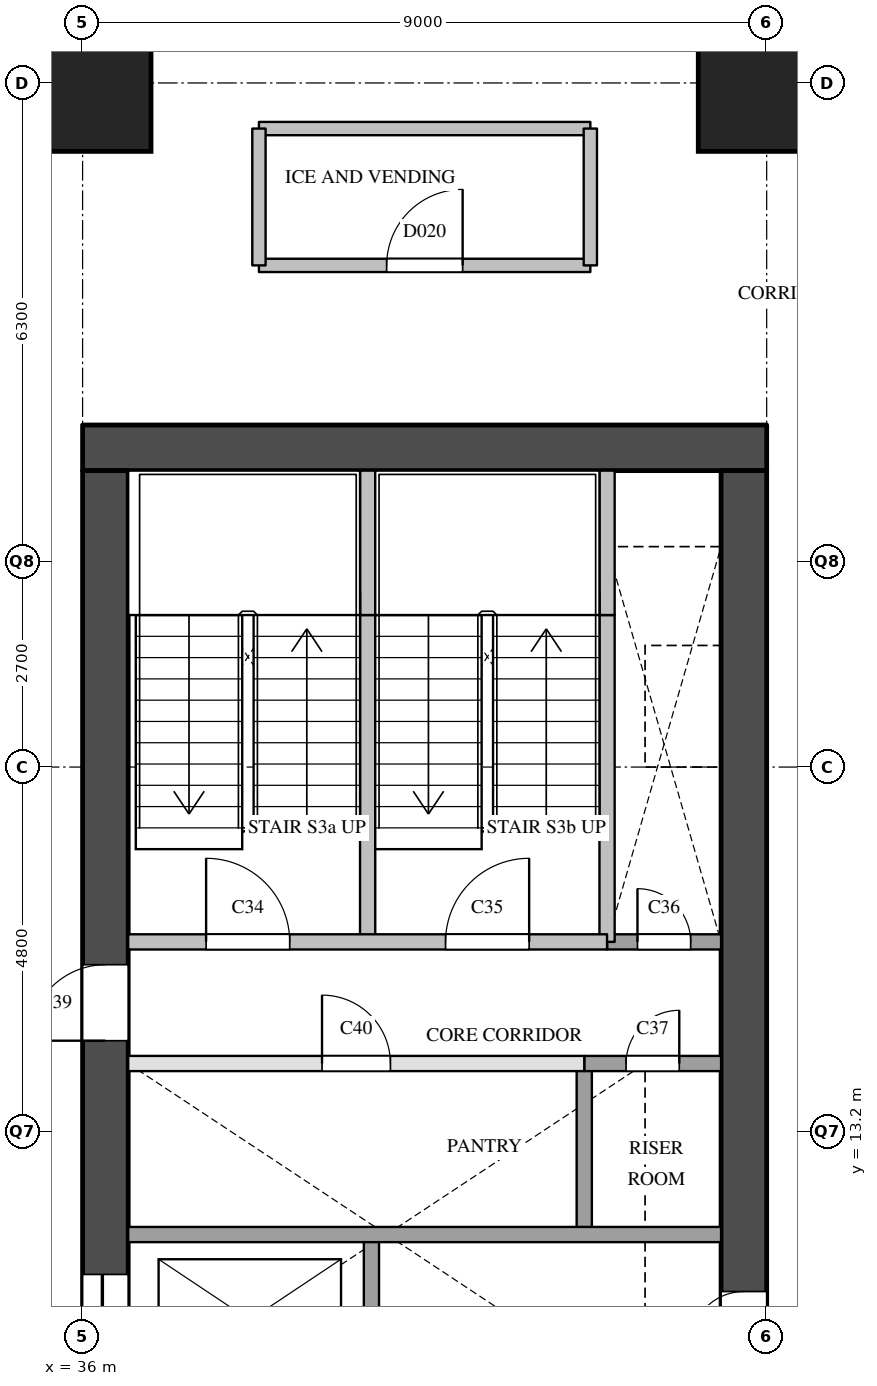
"""IFC4 building model, lengths in metres.
Left out: names, types, materials, properties, quantities, classifications, styles, units other than length and angle.
Written with IfcOpenShell. Run it as: python <this file> out.ifc"""

import sys

from ifc_helpers import new_model, si_unit, direction, frame, frame_2d, origin, origin_2d, place, context, subcontext, project, spatial, rectangle, extrude, element, fill, save


model = new_model("IFC4")
c1 = context("Model", 3, precision=1e-05, world=origin(), true_north=direction((0.0, 1.0)))
c2 = subcontext(c1, "Body", "Model", "MODEL_VIEW")
j1 = project(units=[si_unit("LENGTHUNIT", "METRE"), si_unit("PLANEANGLEUNIT", "RADIAN")], contexts=[c1])
p1 = place(None, origin())
s1 = spatial("IfcSite", under=j1, at=p1, CompositionType="ELEMENT")
p2 = place(p1, origin())
s2 = spatial("IfcBuilding", under=s1, at=p2, CompositionType="ELEMENT")
p3 = place(p2, frame((0.0, 0.0, 85.4)))
s3 = spatial("IfcBuildingStorey", under=s2, at=p3, CompositionType="ELEMENT", Elevation=85.4)
for number, where, z_axis, x_axis in (
    (1, (36.0, 27.0, 0.0), (0.0, 0.0, 1.0), (1.0, 0.0, 0.0)),
    (2, (45.0, 27.0, 0.0), (0.0, 0.0, 1.0), (1.0, 0.0, 0.0)),
):
    element("IfcColumn", number, at=place(p3, frame(where, z_axis=z_axis, x_axis=x_axis)), inside=s3, PredefinedType="COLUMN", context=c2, shape_type="SweptSolid", body=[
        extrude(rectangle(XDim=1.8, YDim=1.8, at=origin_2d()), origin(), (0.0, 0.0, 1.0), 3.8),
    ])
p4 = place(p3, frame((36.0, 22.2, 0.0), z_axis=(0.0, 0.0, 1.0), x_axis=(1.0, 0.0, 0.0)))
e3 = element("IfcWall", 3, at=p4, inside=s3, PredefinedType="SHEAR", context=c2, shape_type="SweptSolid", body=[
    extrude(rectangle(XDim=9.0, YDim=0.6, at=frame_2d((4.5, 0.0))), origin(), (0.0, 0.0, 1.0), 3.5),
])
p5 = place(p3, frame((36.3, 9.6, 0.0), z_axis=(0.0, 0.0, 1.0), x_axis=(0.0, 1.0, 0.0)))
e4 = element("IfcWall", 4, at=p5, inside=s3, PredefinedType="SHEAR", context=c2, shape_type="SweptSolid", body=[
    extrude(rectangle(XDim=12.3, YDim=0.6, at=frame_2d((6.15, 0.0))), origin(), (0.0, 0.0, 1.0), 3.5),
])
p6 = place(p5, frame((0.525, 0.0, 0.0)))
e5 = element("IfcOpeningElement", 5, at=p6, cuts=e4, PredefinedType="OPENING", context=c2, shape_type="SweptSolid", body=[
    extrude(rectangle(XDim=1.2, YDim=2.1, at=frame_2d((0.6, 1.05))), frame((0.0, 0.31, 0.0), z_axis=(0.0, -1.0, 0.0), x_axis=(1.0, 0.0, 0.0)), (0.0, 0.0, 1.0), 0.62),
])
p7 = place(p5, frame((4.8, 0.0, 0.0)))
e6 = element("IfcOpeningElement", 6, at=p7, cuts=e4, PredefinedType="OPENING", context=c2, shape_type="SweptSolid", body=[
    extrude(rectangle(XDim=1.0, YDim=2.1, at=frame_2d((0.5, 1.05))), frame((0.0, 0.31, 0.0), z_axis=(0.0, -1.0, 0.0), x_axis=(1.0, 0.0, 0.0)), (0.0, 0.0, 1.0), 0.62),
])
p8 = place(p3, frame((44.7, 9.6, 0.0), z_axis=(0.0, 0.0, 1.0), x_axis=(0.0, 1.0, 0.0)))
e7 = element("IfcWall", 7, at=p8, inside=s3, PredefinedType="SHEAR", context=c2, shape_type="SweptSolid", body=[
    extrude(rectangle(XDim=12.3, YDim=0.6, at=frame_2d((6.15, 0.0))), origin(), (0.0, 0.0, 1.0), 3.5),
])
p9 = place(p8, frame((0.8, 0.0, 0.0)))
e8 = element("IfcOpeningElement", 8, at=p9, cuts=e7, PredefinedType="OPENING", context=c2, shape_type="SweptSolid", body=[
    extrude(rectangle(XDim=0.7, YDim=2.1, at=frame_2d((0.35, 1.05))), frame((0.0, 0.31, 0.0), z_axis=(0.0, -1.0, 0.0), x_axis=(1.0, 0.0, 0.0)), (0.0, 0.0, 1.0), 0.62),
])
p10 = place(p3, frame((39.75, 15.7, 0.0), z_axis=(0.0, 0.0, 1.0), x_axis=(0.0, 1.0, 0.0)))
e9 = element("IfcWall", 9, at=p10, inside=s3, PredefinedType="SOLIDWALL", context=c2, shape_type="SweptSolid", body=[
    extrude(rectangle(XDim=4.3, YDim=0.2, at=frame_2d((2.15, 0.0))), origin(), (0.0, 0.0, 1.0), 3.5),
])
p11 = place(p3, frame((39.75, 20.0, 0.0), z_axis=(0.0, 0.0, 1.0), x_axis=(0.0, 1.0, 0.0)))
e10 = element("IfcWall", 10, at=p11, inside=s3, PredefinedType="SOLIDWALL", context=c2, shape_type="SweptSolid", body=[
    extrude(rectangle(XDim=1.9, YDim=0.2, at=frame_2d((0.95, 0.0))), origin(), (0.0, 0.0, 1.0), 3.5),
])
p12 = place(p3, frame((39.8, 9.6, 0.0), z_axis=(0.0, 0.0, 1.0), x_axis=(0.0, 1.0, 0.0)))
e11 = element("IfcWall", 11, at=p12, inside=s3, PredefinedType="SOLIDWALL", context=c2, shape_type="SweptSolid", body=[
    extrude(rectangle(XDim=2.3, YDim=0.2, at=frame_2d((1.15, 0.0))), origin(), (0.0, 0.0, 1.0), 3.5),
])
p13 = place(p3, frame((42.6, 11.9, 0.0), z_axis=(0.0, 0.0, 1.0), x_axis=(0.0, 1.0, 0.0)))
e12 = element("IfcWall", 12, at=p13, inside=s3, PredefinedType="SOLIDWALL", context=c2, shape_type="SweptSolid", body=[
    extrude(rectangle(XDim=2.2, YDim=0.2, at=frame_2d((1.1, 0.0))), origin(), (0.0, 0.0, 1.0), 3.5),
])
p14 = place(p3, frame((42.9, 15.7, 0.0), z_axis=(0.0, 0.0, 1.0), x_axis=(0.0, 1.0, 0.0)))
e13 = element("IfcWall", 13, at=p14, inside=s3, PredefinedType="SOLIDWALL", context=c2, shape_type="SweptSolid", body=[
    extrude(rectangle(XDim=4.3, YDim=0.2, at=frame_2d((2.15, 0.0))), origin(), (0.0, 0.0, 1.0), 3.5),
])
p15 = place(p3, frame((42.9, 20.0, 0.0), z_axis=(0.0, 0.0, 1.0), x_axis=(0.0, 1.0, 0.0)))
e14 = element("IfcWall", 14, at=p15, inside=s3, PredefinedType="SOLIDWALL", context=c2, shape_type="SweptSolid", body=[
    extrude(rectangle(XDim=1.9, YDim=0.2, at=frame_2d((0.95, 0.0))), origin(), (0.0, 0.0, 1.0), 3.5),
])
p16 = place(p3, frame((36.6, 11.85, 0.0), z_axis=(0.0, 0.0, 1.0), x_axis=(1.0, 0.0, 0.0)))
e15 = element("IfcWall", 15, at=p16, inside=s3, PredefinedType="SOLIDWALL", context=c2, shape_type="SweptSolid", body=[
    extrude(rectangle(XDim=7.8, YDim=0.2, at=frame_2d((3.9, 0.0))), origin(), (0.0, 0.0, 1.0), 3.5),
])
p17 = place(p3, frame((36.6, 14.1, 0.0), z_axis=(0.0, 0.0, 1.0), x_axis=(1.0, 0.0, 0.0)))
e16 = element("IfcWall", 16, at=p17, inside=s3, PredefinedType="PARTITIONING", context=c2, shape_type="SweptSolid", body=[
    extrude(rectangle(XDim=6.0, YDim=0.2, at=frame_2d((3.0, 0.0))), origin(), (0.0, 0.0, 1.0), 3.5),
])
p18 = place(p17, frame((2.55, 0.0, 0.0)))
e17 = element("IfcOpeningElement", 17, at=p18, cuts=e16, PredefinedType="OPENING", context=c2, shape_type="SweptSolid", body=[
    extrude(rectangle(XDim=0.9, YDim=2.1, at=frame_2d((0.45, 1.05))), frame((0.0, 0.11, 0.0), z_axis=(0.0, -1.0, 0.0), x_axis=(1.0, 0.0, 0.0)), (0.0, 0.0, 1.0), 0.22),
])
p19 = place(p3, frame((42.6, 14.1, 0.0), z_axis=(0.0, 0.0, 1.0), x_axis=(1.0, 0.0, 0.0)))
e18 = element("IfcWall", 18, at=p19, inside=s3, PredefinedType="SOLIDWALL", context=c2, shape_type="SweptSolid", body=[
    extrude(rectangle(XDim=1.8, YDim=0.2, at=frame_2d((0.9, 0.0))), origin(), (0.0, 0.0, 1.0), 3.5),
])
p20 = place(p19, frame((0.55, 0.0, 0.0)))
e19 = element("IfcOpeningElement", 19, at=p20, cuts=e18, PredefinedType="OPENING", context=c2, shape_type="SweptSolid", body=[
    extrude(rectangle(XDim=0.7, YDim=2.1, at=frame_2d((0.35, 1.05))), frame((0.0, 0.11, 0.0), z_axis=(0.0, -1.0, 0.0), x_axis=(1.0, 0.0, 0.0)), (0.0, 0.0, 1.0), 0.22),
])
p21 = place(p3, frame((42.9, 15.7, 0.0), z_axis=(0.0, 0.0, 1.0), x_axis=(1.0, 0.0, 0.0)))
e20 = element("IfcWall", 20, at=p21, inside=s3, PredefinedType="SOLIDWALL", context=c2, shape_type="SweptSolid", body=[
    extrude(rectangle(XDim=1.5, YDim=0.2, at=frame_2d((0.75, 0.0))), origin(), (0.0, 0.0, 1.0), 3.5),
])
p22 = place(p21, frame((0.4, 0.0, 0.0)))
e21 = element("IfcOpeningElement", 21, at=p22, cuts=e20, PredefinedType="OPENING", context=c2, shape_type="SweptSolid", body=[
    extrude(rectangle(XDim=0.7, YDim=2.1, at=frame_2d((0.35, 1.05))), frame((0.0, 0.11, 0.0), z_axis=(0.0, -1.0, 0.0), x_axis=(1.0, 0.0, 0.0)), (0.0, 0.0, 1.0), 0.22),
])
p23 = place(p3, frame((36.6, 15.7, 0.0), z_axis=(0.0, 0.0, 1.0), x_axis=(1.0, 0.0, 0.0)))
e22 = element("IfcWall", 22, at=p23, inside=s3, PredefinedType="SOLIDWALL", context=c2, shape_type="SweptSolid", body=[
    extrude(rectangle(XDim=6.3, YDim=0.2, at=frame_2d((3.15, 0.0))), origin(), (0.0, 0.0, 1.0), 3.5),
])
p24 = place(p23, frame((1.025, 0.0, 0.0)))
e23 = element("IfcOpeningElement", 23, at=p24, cuts=e22, PredefinedType="OPENING", context=c2, shape_type="SweptSolid", body=[
    extrude(rectangle(XDim=1.1, YDim=2.1, at=frame_2d((0.55, 1.05))), frame((0.0, 0.11, 0.0), z_axis=(0.0, -1.0, 0.0), x_axis=(1.0, 0.0, 0.0)), (0.0, 0.0, 1.0), 0.22),
])
p25 = place(p23, frame((4.175, 0.0, 0.0)))
e24 = element("IfcOpeningElement", 24, at=p25, cuts=e22, PredefinedType="OPENING", context=c2, shape_type="SweptSolid", body=[
    extrude(rectangle(XDim=1.1, YDim=2.1, at=frame_2d((0.55, 1.05))), frame((0.0, 0.11, 0.0), z_axis=(0.0, -1.0, 0.0), x_axis=(1.0, 0.0, 0.0)), (0.0, 0.0, 1.0), 0.22),
])
p26 = place(p3, frame((38.32, 24.6, 0.0), z_axis=(0.0, 0.0, 1.0), x_axis=(1.0, 0.0, 0.0)))
e25 = element("IfcWall", 25, at=p26, inside=s3, PredefinedType="PARTITIONING", context=c2, shape_type="SweptSolid", body=[
    extrude(rectangle(XDim=4.36, YDim=0.175, at=frame_2d((2.18, 0.0))), origin(), (0.0, 0.0, 1.0), 3.5),
])
p27 = place(p26, frame((1.68, 0.0, 0.0)))
e26 = element("IfcOpeningElement", 26, at=p27, cuts=e25, PredefinedType="OPENING", context=c2, shape_type="SweptSolid", body=[
    extrude(rectangle(XDim=1.0, YDim=2.1, at=frame_2d((0.5, 1.05))), frame((0.0, 0.097, 0.0), z_axis=(0.0, -1.0, 0.0), x_axis=(1.0, 0.0, 0.0)), (0.0, 0.0, 1.0), 0.195),
])
p28 = place(p3, frame((38.32, 26.4, 0.0), z_axis=(0.0, 0.0, 1.0), x_axis=(1.0, 0.0, 0.0)))
e27 = element("IfcWall", 27, at=p28, inside=s3, PredefinedType="PARTITIONING", context=c2, shape_type="SweptSolid", body=[
    extrude(rectangle(XDim=4.36, YDim=0.175, at=frame_2d((2.18, 0.0))), origin(), (0.0, 0.0, 1.0), 3.5),
])
for number, where, z_axis, x_axis in (
    (28, (38.32, 24.6, 0.0), (0.0, 0.0, 1.0), (0.0, 1.0, 0.0)),
    (29, (42.68, 24.6, 0.0), (0.0, 0.0, 1.0), (0.0, 1.0, 0.0)),
):
    element("IfcWall", number, at=place(p3, frame(where, z_axis=z_axis, x_axis=x_axis)), inside=s3, PredefinedType="PARTITIONING", context=c2, shape_type="SweptSolid", body=[
        extrude(rectangle(XDim=1.8, YDim=0.175, at=frame_2d((0.9, 0.0))), origin(), (0.0, 0.0, 1.0), 3.5),
    ])
p29 = place(p6, origin())
e30 = element("IfcDoor", 30, at=p29, inside=s3, OperationType="SLIDING_TO_LEFT", PredefinedType="DOOR", context=c2, shape_type="SweptSolid", body=[
    extrude(rectangle(XDim=1.2, YDim=2.1, at=frame_2d((0.6, 1.05))), frame((0.0, 0.025, 0.0), z_axis=(0.0, -1.0, 0.0), x_axis=(1.0, 0.0, 0.0)), (0.0, 0.0, 1.0), 0.05),
])
fill(e5, e30)
p30 = place(p24, origin())
e31 = element("IfcDoor", 31, at=p30, inside=s3, OperationType="SINGLE_SWING_LEFT", PredefinedType="DOOR", context=c2, shape_type="SweptSolid", body=[
    extrude(rectangle(XDim=1.1, YDim=2.1, at=frame_2d((0.55, 1.05))), frame((0.0, 0.025, 0.0), z_axis=(0.0, -1.0, 0.0), x_axis=(1.0, 0.0, 0.0)), (0.0, 0.0, 1.0), 0.05),
])
fill(e23, e31)
p31 = place(p25, origin())
e32 = element("IfcDoor", 32, at=p31, inside=s3, OperationType="SINGLE_SWING_RIGHT", PredefinedType="DOOR", context=c2, shape_type="SweptSolid", body=[
    extrude(rectangle(XDim=1.1, YDim=2.1, at=frame_2d((0.55, 1.05))), frame((0.0, 0.025, 0.0), z_axis=(0.0, -1.0, 0.0), x_axis=(1.0, 0.0, 0.0)), (0.0, 0.0, 1.0), 0.05),
])
fill(e24, e32)
p32 = place(p22, origin())
e33 = element("IfcDoor", 33, at=p32, inside=s3, OperationType="SINGLE_SWING_LEFT", PredefinedType="DOOR", context=c2, shape_type="SweptSolid", body=[
    extrude(rectangle(XDim=0.7, YDim=2.1, at=frame_2d((0.35, 1.05))), frame((0.0, 0.025, 0.0), z_axis=(0.0, -1.0, 0.0), x_axis=(1.0, 0.0, 0.0)), (0.0, 0.0, 1.0), 0.05),
])
fill(e21, e33)
p33 = place(p20, origin())
e34 = element("IfcDoor", 34, at=p33, inside=s3, OperationType="SINGLE_SWING_RIGHT", PredefinedType="DOOR", context=c2, shape_type="SweptSolid", body=[
    extrude(rectangle(XDim=0.7, YDim=2.1, at=frame_2d((0.35, 1.05))), frame((0.0, 0.025, 0.0), z_axis=(0.0, -1.0, 0.0), x_axis=(1.0, 0.0, 0.0)), (0.0, 0.0, 1.0), 0.05),
])
fill(e19, e34)
p34 = place(p9, origin())
e35 = element("IfcDoor", 35, at=p34, inside=s3, OperationType="SINGLE_SWING_LEFT", PredefinedType="DOOR", context=c2, shape_type="SweptSolid", body=[
    extrude(rectangle(XDim=0.7, YDim=2.1, at=frame_2d((0.35, 1.05))), frame((0.0, 0.025, 0.0), z_axis=(0.0, -1.0, 0.0), x_axis=(1.0, 0.0, 0.0)), (0.0, 0.0, 1.0), 0.05),
])
fill(e8, e35)
p35 = place(p7, origin())
e36 = element("IfcDoor", 36, at=p35, inside=s3, OperationType="SINGLE_SWING_LEFT", PredefinedType="DOOR", context=c2, shape_type="SweptSolid", body=[
    extrude(rectangle(XDim=1.0, YDim=2.1, at=frame_2d((0.5, 1.05))), frame((0.0, 0.025, 0.0), z_axis=(0.0, -1.0, 0.0), x_axis=(1.0, 0.0, 0.0)), (0.0, 0.0, 1.0), 0.05),
])
fill(e6, e36)
p36 = place(p18, origin())
e37 = element("IfcDoor", 37, at=p36, inside=s3, OperationType="SINGLE_SWING_LEFT", PredefinedType="DOOR", context=c2, shape_type="SweptSolid", body=[
    extrude(rectangle(XDim=0.9, YDim=2.1, at=frame_2d((0.45, 1.05))), frame((0.0, 0.025, 0.0), z_axis=(0.0, -1.0, 0.0), x_axis=(1.0, 0.0, 0.0)), (0.0, 0.0, 1.0), 0.05),
])
fill(e17, e37)
p37 = place(p27, origin())
e38 = element("IfcDoor", 38, at=p37, inside=s3, OperationType="SINGLE_SWING_RIGHT", PredefinedType="DOOR", context=c2, shape_type="SweptSolid", body=[
    extrude(rectangle(XDim=1.0, YDim=2.1, at=frame_2d((0.5, 1.05))), frame((0.0, 0.025, 0.0), z_axis=(0.0, -1.0, 0.0), x_axis=(1.0, 0.0, 0.0)), (0.0, 0.0, 1.0), 0.05),
])
fill(e26, e38)
save(model, sys.argv[1])
